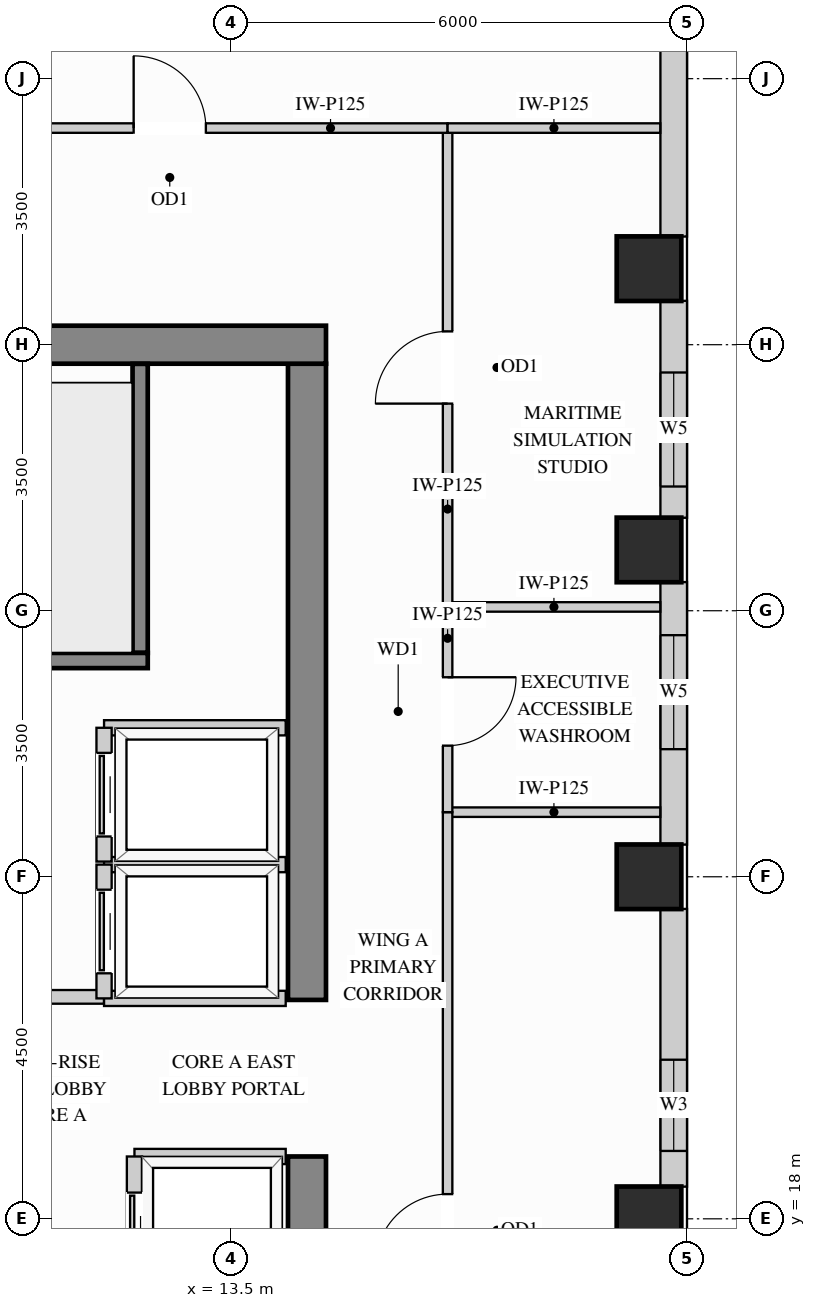
"""IFC4 building model, lengths in metres.
Left out: names, types, materials, properties, quantities, classifications, styles, units other than length and angle.
Written with IfcOpenShell. Run it as: python <this file> out.ifc"""

import sys

from ifc_helpers import new_model, si_unit, direction, frame, frame_2d, origin, origin_2d, place, context, subcontext, project, spatial, rectangle, extrude, source, transform, mapped, element, fill, save


model = new_model("IFC4")
c1 = context("Model", 3, precision=1e-05, world=origin(), true_north=direction((0.0, 1.0)))
c2 = subcontext(c1, "Body", "Model", "MODEL_VIEW")
j1 = project(units=[si_unit("LENGTHUNIT", "METRE"), si_unit("PLANEANGLEUNIT", "RADIAN")], contexts=[c1])
p1 = place(None, origin())
s1 = spatial("IfcSite", under=j1, at=p1, CompositionType="ELEMENT")
p2 = place(p1, origin())
s2 = spatial("IfcBuilding", under=s1, at=p2, CompositionType="ELEMENT")
p3 = place(p2, frame((0.0, 0.0, 273.6)))
s3 = spatial("IfcBuildingStorey", under=s2, at=p3, CompositionType="ELEMENT", Elevation=273.6)
m1 = source(origin(), c2, "Body", "SweptSolid", [
    extrude(rectangle(XDim=0.85, YDim=0.85, at=origin_2d()), origin(), (0.0, 0.0, 1.0), 3.37),
])
for number, where, z_axis, x_axis in (
    (1, (19.0, 18.0, 0.0), (0.0, 0.0, 1.0), (1.0, 0.0, 0.0)),
    (2, (19.0, 22.5, 0.0), (0.0, 0.0, 1.0), (1.0, 0.0, 0.0)),
    (3, (19.0, 26.8, 0.0), (0.0, 0.0, 1.0), (1.0, 0.0, 0.0)),
    (4, (19.0, 30.5, 0.0), (0.0, 0.0, 1.0), (1.0, 0.0, 0.0)),
):
    element("IfcColumn", number, at=place(p3, frame(where, z_axis=z_axis, x_axis=x_axis)), inside=s3, PredefinedType="COLUMN", context=c2, shape_type="MappedRepresentation", body=[
        mapped(m1, transform((0.0, 0.0, 0.0), x_axis=(1.0, 0.0, 0.0), y_axis=(0.0, 1.0, 0.0), z_axis=(0.0, 0.0, 1.0))),
    ])
m2 = source(origin(), c2, "Body", "SweptSolid", [
    extrude(rectangle(XDim=10.07, YDim=0.5, at=frame_2d((5.035, 0.0))), origin(), (0.0, 0.0, 1.0), 3.37),
])
p4 = place(p3, frame((14.5, 8.75, 0.0), z_axis=(0.0, 0.0, 1.0), x_axis=(0.0, 1.0, 0.0)))
e5 = element("IfcWall", 5, at=p4, inside=s3, PredefinedType="SHEAR", context=c2, shape_type="MappedRepresentation", body=[
    mapped(m2, transform((0.0, 0.0, 0.0), x_axis=(1.0, 0.0, 0.0), y_axis=(0.0, 1.0, 0.0), z_axis=(0.0, 0.0, 1.0))),
])
m3 = source(origin(), c2, "Body", "SweptSolid", [
    extrude(rectangle(XDim=8.37, YDim=0.5, at=frame_2d((4.185, 0.0))), origin(), (0.0, 0.0, 1.0), 3.37),
])
p5 = place(p3, frame((14.5, 20.88, 0.0), z_axis=(0.0, 0.0, 1.0), x_axis=(0.0, 1.0, 0.0)))
e6 = element("IfcWall", 6, at=p5, inside=s3, PredefinedType="SHEAR", context=c2, shape_type="MappedRepresentation", body=[
    mapped(m3, transform((0.0, 0.0, 0.0), x_axis=(1.0, 0.0, 0.0), y_axis=(0.0, 1.0, 0.0), z_axis=(0.0, 0.0, 1.0))),
])
m4 = source(origin(), c2, "Body", "SweptSolid", [
    extrude(rectangle(XDim=10.5, YDim=0.5, at=frame_2d((5.25, 0.0))), origin(), (0.0, 0.0, 1.0), 3.37),
])
p6 = place(p3, frame((4.25, 29.5, 0.0), z_axis=(0.0, 0.0, 1.0), x_axis=(1.0, 0.0, 0.0)))
e7 = element("IfcWall", 7, at=p6, inside=s3, PredefinedType="SHEAR", context=c2, shape_type="MappedRepresentation", body=[
    mapped(m4, transform((0.0, 0.0, 0.0), x_axis=(1.0, 0.0, 0.0), y_axis=(0.0, 1.0, 0.0), z_axis=(0.0, 0.0, 1.0))),
])
p7 = place(p3, frame((19.325, 18.423, 0.0), z_axis=(0.0, 0.0, 1.0), x_axis=(0.0, 1.0, 0.0)))
e8 = element("IfcWall", 8, at=p7, inside=s3, PredefinedType="SOLIDWALL", context=c2, shape_type="SweptSolid", body=[
    extrude(rectangle(XDim=3.654, YDim=0.35, at=frame_2d((1.827, 0.0))), origin(), (0.0, 0.0, 1.0), 2.589),
])
p8 = place(p7, frame((0.47, 0.0, 0.78)))
e9 = element("IfcOpeningElement", 9, at=p8, cuts=e8, PredefinedType="OPENING", context=c2, shape_type="SweptSolid", body=[
    extrude(rectangle(XDim=1.2, YDim=1.629, at=frame_2d((0.6, 0.814))), frame((0.0, 0.185, 0.0), z_axis=(0.0, -1.0, 0.0), x_axis=(1.0, 0.0, 0.0)), (0.0, 0.0, 1.0), 0.37),
])
p9 = place(p3, frame((19.325, 22.923, 0.0), z_axis=(0.0, 0.0, 1.0), x_axis=(0.0, 1.0, 0.0)))
e10 = element("IfcWall", 10, at=p9, inside=s3, PredefinedType="SOLIDWALL", context=c2, shape_type="SweptSolid", body=[
    extrude(rectangle(XDim=3.454, YDim=0.35, at=frame_2d((1.727, 0.0))), origin(), (0.0, 0.0, 1.0), 2.589),
])
p10 = place(p9, frame((1.256, 0.0, 0.78)))
e11 = element("IfcOpeningElement", 11, at=p10, cuts=e10, PredefinedType="OPENING", context=c2, shape_type="SweptSolid", body=[
    extrude(rectangle(XDim=1.5, YDim=1.629, at=frame_2d((0.75, 0.814))), frame((0.0, 0.185, 0.0), z_axis=(0.0, -1.0, 0.0), x_axis=(1.0, 0.0, 0.0)), (0.0, 0.0, 1.0), 0.37),
])
p11 = place(p3, frame((19.325, 27.223, 0.0), z_axis=(0.0, 0.0, 1.0), x_axis=(0.0, 1.0, 0.0)))
e12 = element("IfcWall", 12, at=p11, inside=s3, PredefinedType="SOLIDWALL", context=c2, shape_type="SweptSolid", body=[
    extrude(rectangle(XDim=2.854, YDim=0.35, at=frame_2d((1.427, 0.0))), origin(), (0.0, 0.0, 1.0), 2.589),
])
p12 = place(p11, frame((0.411, 0.0, 0.78)))
e13 = element("IfcOpeningElement", 13, at=p12, cuts=e12, PredefinedType="OPENING", context=c2, shape_type="SweptSolid", body=[
    extrude(rectangle(XDim=1.5, YDim=1.629, at=frame_2d((0.75, 0.814))), frame((0.0, 0.185, 0.0), z_axis=(0.0, -1.0, 0.0), x_axis=(1.0, 0.0, 0.0)), (0.0, 0.0, 1.0), 0.37),
])
m5 = source(origin(), c2, "Body", "SweptSolid", [
    extrude(rectangle(XDim=3.654, YDim=0.35, at=frame_2d((1.827, 0.0))), origin(), (0.0, 0.0, 1.0), 2.589),
])
p13 = place(p3, frame((19.325, 30.923, 0.0), z_axis=(0.0, 0.0, 1.0), x_axis=(0.0, 1.0, 0.0)))
e14 = element("IfcWall", 14, at=p13, inside=s3, PredefinedType="SOLIDWALL", context=c2, shape_type="MappedRepresentation", body=[
    mapped(m5, transform((0.0, 0.0, 0.0), x_axis=(1.0, 0.0, 0.0), y_axis=(0.0, 1.0, 0.0), z_axis=(0.0, 0.0, 1.0))),
])
p14 = place(p3, frame((7.15, 20.92, 0.0), z_axis=(0.0, 0.0, 1.0), x_axis=(1.0, 0.0, 0.0)))
e15 = element("IfcWall", 15, at=p14, inside=s3, PredefinedType="PARTITIONING", context=c2, shape_type="SweptSolid", body=[
    extrude(rectangle(XDim=4.68, YDim=0.18, at=frame_2d((2.34, 0.0))), origin(), (0.0, 0.0, 1.0), 3.355),
])
p15 = place(p14, frame((2.2, 0.0, 0.0)))
e16 = element("IfcOpeningElement", 16, at=p15, cuts=e15, PredefinedType="OPENING", context=c2, shape_type="SweptSolid", body=[
    extrude(rectangle(XDim=1.1, YDim=2.15, at=frame_2d((0.55, 1.075))), frame((0.0, 0.1, 0.0), z_axis=(0.0, -1.0, 0.0), x_axis=(1.0, 0.0, 0.0)), (0.0, 0.0, 1.0), 0.2),
])
m6 = source(origin(), c2, "Body", "SweptSolid", [
    extrude(rectangle(XDim=2.798, YDim=0.125, at=frame_2d((1.399, 0.0))), origin(), (0.0, 0.0, 1.0), 3.355),
])
for number, where, z_axis, x_axis in (
    (17, (16.35, 23.35, 0.0), (0.0, 0.0, 1.0), (1.0, 0.0, 0.0)),
    (18, (16.35, 26.05, 0.0), (0.0, 0.0, 1.0), (1.0, 0.0, 0.0)),
):
    element("IfcWall", number, at=place(p3, frame(where, z_axis=z_axis, x_axis=x_axis)), inside=s3, PredefinedType="PARTITIONING", context=c2, shape_type="MappedRepresentation", body=[
        mapped(m6, transform((0.0, 0.0, 0.0), x_axis=(1.0, 0.0, 0.0), y_axis=(0.0, 1.0, 0.0), z_axis=(0.0, 0.0, 1.0))),
    ])
p16 = place(p3, frame((16.35, 12.35, 0.0), z_axis=(0.0, 0.0, 1.0), x_axis=(0.0, 1.0, 0.0)))
e19 = element("IfcWall", 19, at=p16, inside=s3, PredefinedType="PARTITIONING", context=c2, shape_type="SweptSolid", body=[
    extrude(rectangle(XDim=11.0, YDim=0.125, at=frame_2d((5.5, 0.0))), origin(), (0.0, 0.0, 1.0), 3.355),
])
p17 = place(p16, frame((5.025, 0.0, 0.0)))
e20 = element("IfcOpeningElement", 20, at=p17, cuts=e19, PredefinedType="OPENING", context=c2, shape_type="SweptSolid", body=[
    extrude(rectangle(XDim=0.95, YDim=2.15, at=frame_2d((0.475, 1.075))), frame((0.0, 0.073, 0.0), z_axis=(0.0, -1.0, 0.0), x_axis=(1.0, 0.0, 0.0)), (0.0, 0.0, 1.0), 0.145),
])
p18 = place(p3, frame((16.35, 26.05, 0.0), z_axis=(0.0, 0.0, 1.0), x_axis=(0.0, 1.0, 0.0)))
e21 = element("IfcWall", 21, at=p18, inside=s3, PredefinedType="PARTITIONING", context=c2, shape_type="SweptSolid", body=[
    extrude(rectangle(XDim=6.3, YDim=0.125, at=frame_2d((3.15, 0.0))), origin(), (0.0, 0.0, 1.0), 3.355),
])
p19 = place(p18, frame((2.675, 0.0, 0.0)))
e22 = element("IfcOpeningElement", 22, at=p19, cuts=e21, PredefinedType="OPENING", context=c2, shape_type="SweptSolid", body=[
    extrude(rectangle(XDim=0.95, YDim=2.15, at=frame_2d((0.475, 1.075))), frame((0.0, 0.073, 0.0), z_axis=(0.0, -1.0, 0.0), x_axis=(1.0, 0.0, 0.0)), (0.0, 0.0, 1.0), 0.145),
])
p20 = place(p3, frame((16.35, 23.35, 0.0), z_axis=(0.0, 0.0, 1.0), x_axis=(0.0, 1.0, 0.0)))
e23 = element("IfcWall", 23, at=p20, inside=s3, PredefinedType="PARTITIONING", context=c2, shape_type="SweptSolid", body=[
    extrude(rectangle(XDim=2.7, YDim=0.125, at=frame_2d((1.35, 0.0))), origin(), (0.0, 0.0, 1.0), 3.355),
])
p21 = place(p20, frame((0.875, 0.0, 0.0)))
e24 = element("IfcOpeningElement", 24, at=p21, cuts=e23, PredefinedType="OPENING", context=c2, shape_type="SweptSolid", body=[
    extrude(rectangle(XDim=0.9, YDim=2.15, at=frame_2d((0.45, 1.075))), frame((0.0, 0.073, 0.0), z_axis=(0.0, -1.0, 0.0), x_axis=(1.0, 0.0, 0.0)), (0.0, 0.0, 1.0), 0.145),
])
p22 = place(p3, frame((9.039, 32.35, 0.0), z_axis=(0.0, 0.0, 1.0), x_axis=(1.0, 0.0, 0.0)))
e25 = element("IfcWall", 25, at=p22, inside=s3, PredefinedType="PARTITIONING", context=c2, shape_type="SweptSolid", body=[
    extrude(rectangle(XDim=7.311, YDim=0.125, at=frame_2d((3.656, 0.0))), origin(), (0.0, 0.0, 1.0), 3.355),
])
p23 = place(p22, frame((3.18, 0.0, 0.0)))
e26 = element("IfcOpeningElement", 26, at=p23, cuts=e25, PredefinedType="OPENING", context=c2, shape_type="SweptSolid", body=[
    extrude(rectangle(XDim=0.95, YDim=2.15, at=frame_2d((0.475, 1.075))), frame((0.0, 0.073, 0.0), z_axis=(0.0, -1.0, 0.0), x_axis=(1.0, 0.0, 0.0)), (0.0, 0.0, 1.0), 0.145),
])
p24 = place(p3, frame((16.35, 32.35, 0.0), z_axis=(0.0, 0.0, 1.0), x_axis=(1.0, 0.0, 0.0)))
e27 = element("IfcWall", 27, at=p24, inside=s3, PredefinedType="PARTITIONING", context=c2, shape_type="MappedRepresentation", body=[
    mapped(m6, transform((0.0, 0.0, 0.0), x_axis=(1.0, 0.0, 0.0), y_axis=(0.0, 1.0, 0.0), z_axis=(0.0, 0.0, 1.0))),
])
m7 = source(origin(), c2, "Body", "SweptSolid", [
    extrude(rectangle(XDim=2.39, YDim=0.2, at=frame_2d((1.195, 0.0))), origin(), (0.0, 0.0, 1.0), 3.355),
])
for number, where, z_axis, x_axis in (
    (28, (11.83, 22.66, 0.0), (0.0, 0.0, 1.0), (1.0, 0.0, 0.0)),
    (29, (11.83, 20.9, 0.0), (0.0, 0.0, 1.0), (1.0, 0.0, 0.0)),
):
    element("IfcWall", number, at=place(p3, frame(where, z_axis=z_axis, x_axis=x_axis)), inside=s3, PredefinedType="PARTITIONING", context=c2, shape_type="MappedRepresentation", body=[
        mapped(m7, transform((0.0, 0.0, 0.0), x_axis=(1.0, 0.0, 0.0), y_axis=(0.0, 1.0, 0.0), z_axis=(0.0, 0.0, 1.0))),
    ])
p25 = place(p3, frame((11.83, 20.9, 0.0), z_axis=(0.0, 0.0, 1.0), x_axis=(0.0, 1.0, 0.0)))
e30 = element("IfcWall", 30, at=p25, inside=s3, PredefinedType="PARTITIONING", context=c2, shape_type="SweptSolid", body=[
    extrude(rectangle(XDim=1.76, YDim=0.2, at=frame_2d((0.88, 0.0))), origin(), (0.0, 0.0, 1.0), 3.355),
])
p26 = place(p25, frame((0.33, 0.0, 0.0)))
e31 = element("IfcOpeningElement", 31, at=p26, cuts=e30, PredefinedType="OPENING", context=c2, shape_type="SweptSolid", body=[
    extrude(rectangle(XDim=1.1, YDim=2.2, at=frame_2d((0.55, 1.1))), frame((0.0, 0.11, 0.0), z_axis=(0.0, -1.0, 0.0), x_axis=(1.0, 0.0, 0.0)), (0.0, 0.0, 1.0), 0.22),
])
p27 = place(p3, frame((11.83, 24.46, 0.0), z_axis=(0.0, 0.0, 1.0), x_axis=(1.0, 0.0, 0.0)))
e32 = element("IfcWall", 32, at=p27, inside=s3, PredefinedType="PARTITIONING", context=c2, shape_type="MappedRepresentation", body=[
    mapped(m7, transform((0.0, 0.0, 0.0), x_axis=(1.0, 0.0, 0.0), y_axis=(0.0, 1.0, 0.0), z_axis=(0.0, 0.0, 1.0))),
])
p28 = place(p3, frame((11.83, 22.7, 0.0), z_axis=(0.0, 0.0, 1.0), x_axis=(0.0, 1.0, 0.0)))
e33 = element("IfcWall", 33, at=p28, inside=s3, PredefinedType="PARTITIONING", context=c2, shape_type="SweptSolid", body=[
    extrude(rectangle(XDim=1.76, YDim=0.2, at=frame_2d((0.88, 0.0))), origin(), (0.0, 0.0, 1.0), 3.355),
])
p29 = place(p28, frame((0.33, 0.0, 0.0)))
e34 = element("IfcOpeningElement", 34, at=p29, cuts=e33, PredefinedType="OPENING", context=c2, shape_type="SweptSolid", body=[
    extrude(rectangle(XDim=1.1, YDim=2.2, at=frame_2d((0.55, 1.1))), frame((0.0, 0.11, 0.0), z_axis=(0.0, -1.0, 0.0), x_axis=(1.0, 0.0, 0.0)), (0.0, 0.0, 1.0), 0.22),
])
m8 = source(origin(), c2, "Body", "SweptSolid", [
    extrude(rectangle(XDim=1.99, YDim=0.2, at=frame_2d((0.995, 0.0))), origin(), (0.0, 0.0, 1.0), 3.355),
])
p30 = place(p3, frame((12.23, 18.82, 0.0), z_axis=(0.0, 0.0, 1.0), x_axis=(1.0, 0.0, 0.0)))
e35 = element("IfcWall", 35, at=p30, inside=s3, PredefinedType="PARTITIONING", context=c2, shape_type="MappedRepresentation", body=[
    mapped(m8, transform((0.0, 0.0, 0.0), x_axis=(1.0, 0.0, 0.0), y_axis=(0.0, 1.0, 0.0), z_axis=(0.0, 0.0, 1.0))),
])
p31 = place(p3, frame((12.23, 16.77, 0.0), z_axis=(0.0, 0.0, 1.0), x_axis=(0.0, 1.0, 0.0)))
e36 = element("IfcWall", 36, at=p31, inside=s3, PredefinedType="PARTITIONING", context=c2, shape_type="SweptSolid", body=[
    extrude(rectangle(XDim=2.05, YDim=0.2, at=frame_2d((1.025, 0.0))), origin(), (0.0, 0.0, 1.0), 3.355),
])
p32 = place(p31, frame((0.475, 0.0, 0.0)))
e37 = element("IfcOpeningElement", 37, at=p32, cuts=e36, PredefinedType="OPENING", context=c2, shape_type="SweptSolid", body=[
    extrude(rectangle(XDim=1.1, YDim=2.2, at=frame_2d((0.55, 1.1))), frame((0.0, 0.11, 0.0), z_axis=(0.0, -1.0, 0.0), x_axis=(1.0, 0.0, 0.0)), (0.0, 0.0, 1.0), 0.22),
])
m9 = source(origin(), c2, "Body", "SweptSolid", [
    extrude(rectangle(XDim=3.803, YDim=0.2, at=frame_2d((1.901, 0.0))), origin(), (0.0, 0.0, 1.0), 3.37),
])
p33 = place(p3, frame((12.305, 25.445, 0.0), z_axis=(0.0, 0.0, 1.0), x_axis=(0.0, 1.0, 0.0)))
e38 = element("IfcWall", 38, at=p33, inside=s3, PredefinedType="SHEAR", context=c2, shape_type="MappedRepresentation", body=[
    mapped(m9, transform((0.0, 0.0, 0.0), x_axis=(1.0, 0.0, 0.0), y_axis=(0.0, 1.0, 0.0), z_axis=(0.0, 0.0, 1.0))),
])
p34 = place(p3, frame((4.752, 25.345, 0.0), z_axis=(0.0, 0.0, 1.0), x_axis=(1.0, 0.0, 0.0)))
e39 = element("IfcWall", 39, at=p34, inside=s3, PredefinedType="SHEAR", context=c2, shape_type="SweptSolid", body=[
    extrude(rectangle(XDim=7.653, YDim=0.2, at=frame_2d((3.827, 0.0))), origin(), (0.0, 0.0, 1.0), 3.37),
])
p35 = place(p34, frame((0.4, 0.0, 0.0)))
e40 = element("IfcOpeningElement", 40, at=p35, cuts=e39, PredefinedType="OPENING", context=c2, shape_type="SweptSolid", body=[
    extrude(rectangle(XDim=1.1, YDim=2.15, at=frame_2d((0.55, 1.075))), frame((0.0, 0.11, 0.0), z_axis=(0.0, -1.0, 0.0), x_axis=(1.0, 0.0, 0.0)), (0.0, 0.0, 1.0), 0.22),
])
m10 = source(origin(), c2, "Body", "SweptSolid", [
    extrude(rectangle(XDim=1.1, YDim=2.2, at=frame_2d((0.55, 1.1))), frame((0.0, 0.025, 0.0), z_axis=(0.0, -1.0, 0.0), x_axis=(1.0, 0.0, 0.0)), (0.0, 0.0, 1.0), 0.05),
])
p36 = place(p26, origin())
e41 = element("IfcDoor", 41, at=p36, inside=s3, OperationType="SLIDING_TO_LEFT", PredefinedType="DOOR", context=c2, shape_type="MappedRepresentation", body=[
    mapped(m10, transform((0.0, 0.0, 0.0), x_axis=(1.0, 0.0, 0.0), y_axis=(0.0, 1.0, 0.0), z_axis=(0.0, 0.0, 1.0))),
])
fill(e31, e41)
p37 = place(p29, origin())
e42 = element("IfcDoor", 42, at=p37, inside=s3, OperationType="SLIDING_TO_LEFT", PredefinedType="DOOR", context=c2, shape_type="MappedRepresentation", body=[
    mapped(m10, transform((0.0, 0.0, 0.0), x_axis=(1.0, 0.0, 0.0), y_axis=(0.0, 1.0, 0.0), z_axis=(0.0, 0.0, 1.0))),
])
fill(e34, e42)
p38 = place(p32, origin())
e43 = element("IfcDoor", 43, at=p38, inside=s3, OperationType="SLIDING_TO_LEFT", PredefinedType="DOOR", context=c2, shape_type="MappedRepresentation", body=[
    mapped(m10, transform((0.0, 0.0, 0.0), x_axis=(1.0, 0.0, 0.0), y_axis=(0.0, 1.0, 0.0), z_axis=(0.0, 0.0, 1.0))),
])
fill(e37, e43)
m11 = source(origin(), c2, "Body", "SweptSolid", [
    extrude(rectangle(XDim=0.95, YDim=2.15, at=frame_2d((0.475, 1.075))), frame((0.0, 0.025, 0.0), z_axis=(0.0, -1.0, 0.0), x_axis=(1.0, 0.0, 0.0)), (0.0, 0.0, 1.0), 0.05),
])
p39 = place(p17, origin())
e44 = element("IfcDoor", 44, at=p39, inside=s3, OperationType="SINGLE_SWING_LEFT", PredefinedType="DOOR", context=c2, shape_type="MappedRepresentation", body=[
    mapped(m11, transform((0.0, 0.0, 0.0), x_axis=(1.0, 0.0, 0.0), y_axis=(0.0, 1.0, 0.0), z_axis=(0.0, 0.0, 1.0))),
])
fill(e20, e44)
p40 = place(p19, origin())
e45 = element("IfcDoor", 45, at=p40, inside=s3, OperationType="SINGLE_SWING_LEFT", PredefinedType="DOOR", context=c2, shape_type="MappedRepresentation", body=[
    mapped(m11, transform((0.0, 0.0, 0.0), x_axis=(1.0, 0.0, 0.0), y_axis=(0.0, 1.0, 0.0), z_axis=(0.0, 0.0, 1.0))),
])
fill(e22, e45)
p41 = place(p23, origin())
e46 = element("IfcDoor", 46, at=p41, inside=s3, OperationType="SINGLE_SWING_LEFT", PredefinedType="DOOR", context=c2, shape_type="MappedRepresentation", body=[
    mapped(m11, transform((0.0, 0.0, 0.0), x_axis=(1.0, 0.0, 0.0), y_axis=(0.0, 1.0, 0.0), z_axis=(0.0, 0.0, 1.0))),
])
fill(e26, e46)
m12 = source(origin(), c2, "Body", "SweptSolid", [
    extrude(rectangle(XDim=0.9, YDim=2.15, at=frame_2d((0.45, 1.075))), frame((0.0, 0.025, 0.0), z_axis=(0.0, -1.0, 0.0), x_axis=(1.0, 0.0, 0.0)), (0.0, 0.0, 1.0), 0.05),
])
p42 = place(p21, origin())
e47 = element("IfcDoor", 47, at=p42, inside=s3, OperationType="SINGLE_SWING_RIGHT", PredefinedType="DOOR", context=c2, shape_type="MappedRepresentation", body=[
    mapped(m12, transform((0.0, 0.0, 0.0), x_axis=(1.0, 0.0, 0.0), y_axis=(0.0, 1.0, 0.0), z_axis=(0.0, 0.0, 1.0))),
])
fill(e24, e47)
m13 = source(origin(), c2, "Body", "SweptSolid", [
    extrude(rectangle(XDim=1.2, YDim=1.629, at=frame_2d((0.6, 0.814))), frame((0.0, 0.03, 0.0), z_axis=(0.0, -1.0, 0.0), x_axis=(1.0, 0.0, 0.0)), (0.0, 0.0, 1.0), 0.06),
])
p43 = place(p8, origin())
e48 = element("IfcWindow", 48, at=p43, inside=s3, PartitioningType="SINGLE_PANEL", PredefinedType="WINDOW", context=c2, shape_type="MappedRepresentation", body=[
    mapped(m13, transform((0.0, 0.0, 0.0), x_axis=(1.0, 0.0, 0.0), y_axis=(0.0, 1.0, 0.0), z_axis=(0.0, 0.0, 1.0))),
])
fill(e9, e48)
m14 = source(origin(), c2, "Body", "SweptSolid", [
    extrude(rectangle(XDim=1.5, YDim=1.629, at=frame_2d((0.75, 0.814))), frame((0.0, 0.03, 0.0), z_axis=(0.0, -1.0, 0.0), x_axis=(1.0, 0.0, 0.0)), (0.0, 0.0, 1.0), 0.06),
])
p44 = place(p10, origin())
e49 = element("IfcWindow", 49, at=p44, inside=s3, PartitioningType="SINGLE_PANEL", PredefinedType="WINDOW", context=c2, shape_type="MappedRepresentation", body=[
    mapped(m14, transform((0.0, 0.0, 0.0), x_axis=(1.0, 0.0, 0.0), y_axis=(0.0, 1.0, 0.0), z_axis=(0.0, 0.0, 1.0))),
])
fill(e11, e49)
p45 = place(p12, origin())
e50 = element("IfcWindow", 50, at=p45, inside=s3, PartitioningType="SINGLE_PANEL", PredefinedType="WINDOW", context=c2, shape_type="MappedRepresentation", body=[
    mapped(m14, transform((0.0, 0.0, 0.0), x_axis=(1.0, 0.0, 0.0), y_axis=(0.0, 1.0, 0.0), z_axis=(0.0, 0.0, 1.0))),
])
fill(e13, e50)
save(model, sys.argv[1])
